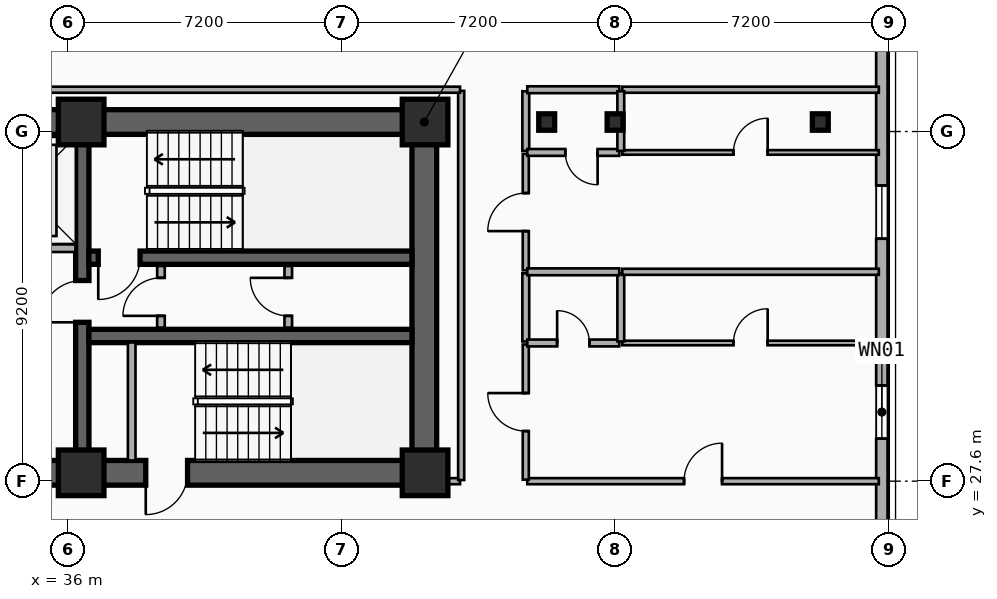
"""IFC4 building model, lengths in metres.
Left out: names, types, materials, properties, quantities, classifications, styles, units other than length and angle.
Written with IfcOpenShell. Run it as: python <this file> out.ifc"""

import sys

from ifc_helpers import new_model, si_unit, direction, frame, frame_2d, origin, origin_2d, place, context, subcontext, project, spatial, rectangle, i_section, extrude, element, fill, save


model = new_model("IFC4")
c1 = context("Model", 3, precision=1e-05, world=origin(), true_north=direction((0.0, 1.0)))
c2 = subcontext(c1, "Body", "Model", "MODEL_VIEW")
j1 = project(units=[si_unit("LENGTHUNIT", "METRE"), si_unit("PLANEANGLEUNIT", "RADIAN")], contexts=[c1])
p1 = place(None, origin())
s1 = spatial("IfcSite", under=j1, at=p1, CompositionType="ELEMENT")
p2 = place(p1, origin())
s2 = spatial("IfcBuilding", under=s1, at=p2, CompositionType="ELEMENT")
p3 = place(p2, frame((0.0, 0.0, 111.8)))
s3 = spatial("IfcBuildingStorey", under=s2, at=p3, CompositionType="ELEMENT", Elevation=111.8)
p4 = place(p3, frame((12.15, 37.05, 0.0), z_axis=(0.0, 0.0, 1.0), x_axis=(1.0, 0.0, 0.0)))
e1 = element("IfcWall", 1, at=p4, inside=s3, PredefinedType="SHEAR", context=c2, shape_type="SweptSolid", body=[
    extrude(rectangle(XDim=33.23, YDim=0.65, at=frame_2d((16.615, 0.0))), origin(), (0.0, 0.0, 1.0), 3.5),
])
p5 = place(p3, frame((45.38, 27.82, 0.0), z_axis=(0.0, 0.0, 1.0), x_axis=(-1.0, 0.0, 0.0)))
e2 = element("IfcWall", 2, at=p5, inside=s3, PredefinedType="SHEAR", context=c2, shape_type="SweptSolid", body=[
    extrude(rectangle(XDim=12.23, YDim=0.65, at=frame_2d((6.115, 0.0))), origin(), (0.0, 0.0, 1.0), 3.5),
])
p6 = place(p5, frame((9.93, 0.0, 0.0)))
e3 = element("IfcOpeningElement", 3, at=p6, cuts=e2, PredefinedType="OPENING", context=c2, shape_type="SweptSolid", body=[
    extrude(rectangle(XDim=1.1, YDim=2.15, at=frame_2d((0.55, 1.075))), frame((0.0, 0.335, 0.0), z_axis=(0.0, -1.0, 0.0), x_axis=(1.0, 0.0, 0.0)), (0.0, 0.0, 1.0), 0.67),
])
p7 = place(p5, frame((6.23, 0.0, 0.0)))
e4 = element("IfcOpeningElement", 4, at=p7, cuts=e2, PredefinedType="OPENING", context=c2, shape_type="SweptSolid", body=[
    extrude(rectangle(XDim=1.1, YDim=2.15, at=frame_2d((0.55, 1.075))), frame((0.0, 0.335, 0.0), z_axis=(0.0, -1.0, 0.0), x_axis=(1.0, 0.0, 0.0)), (0.0, 0.0, 1.0), 0.67),
])
p8 = place(p3, frame((45.38, 28.145, 0.0), z_axis=(0.0, 0.0, 1.0), x_axis=(0.0, 1.0, 0.0)))
e5 = element("IfcWall", 5, at=p8, inside=s3, PredefinedType="SHEAR", context=c2, shape_type="SweptSolid", body=[
    extrude(rectangle(XDim=8.58, YDim=0.65, at=frame_2d((4.29, 0.0))), origin(), (0.0, 0.0, 1.0), 3.5),
])
p9 = place(p3, frame((36.38, 28.145, 0.0), z_axis=(0.0, 0.0, 1.0), x_axis=(0.0, 1.0, 0.0)))
e6 = element("IfcWall", 6, at=p9, inside=s3, PredefinedType="SHEAR", context=c2, shape_type="SweptSolid", body=[
    extrude(rectangle(XDim=8.58, YDim=0.35, at=frame_2d((4.29, 0.0))), origin(), (0.0, 0.0, 1.0), 3.5),
])
p10 = place(p9, frame((3.635, 0.0, 0.0)))
e7 = element("IfcOpeningElement", 7, at=p10, cuts=e6, PredefinedType="OPENING", context=c2, shape_type="SweptSolid", body=[
    extrude(rectangle(XDim=1.1, YDim=2.15, at=frame_2d((0.55, 1.075))), frame((0.0, 0.185, 0.0), z_axis=(0.0, -1.0, 0.0), x_axis=(1.0, 0.0, 0.0)), (0.0, 0.0, 1.0), 0.37),
])
p11 = place(p3, frame((45.055, 33.48, 0.0), z_axis=(0.0, 0.0, 1.0), x_axis=(-1.0, 0.0, 0.0)))
e8 = element("IfcWall", 8, at=p11, inside=s3, PredefinedType="SHEAR", context=c2, shape_type="SweptSolid", body=[
    extrude(rectangle(XDim=8.5, YDim=0.35, at=frame_2d((4.25, 0.0))), origin(), (0.0, 0.0, 1.0), 3.5),
])
p12 = place(p11, frame((7.155, 0.0, 0.0)))
e9 = element("IfcOpeningElement", 9, at=p12, cuts=e8, PredefinedType="OPENING", context=c2, shape_type="SweptSolid", body=[
    extrude(rectangle(XDim=1.1, YDim=2.15, at=frame_2d((0.55, 1.075))), frame((0.0, 0.185, 0.0), z_axis=(0.0, -1.0, 0.0), x_axis=(1.0, 0.0, 0.0)), (0.0, 0.0, 1.0), 0.37),
])
p13 = place(p3, frame((36.555, 31.42, 0.0), z_axis=(0.0, 0.0, 1.0), x_axis=(1.0, 0.0, 0.0)))
e10 = element("IfcWall", 10, at=p13, inside=s3, PredefinedType="SHEAR", context=c2, shape_type="SweptSolid", body=[
    extrude(rectangle(XDim=8.5, YDim=0.35, at=frame_2d((4.25, 0.0))), origin(), (0.0, 0.0, 1.0), 3.5),
])
for number, where, z_axis, x_axis in (
    (11, (36.35, 27.82, 0.0), (0.0, 0.0, 1.0), (1.0, 0.0, 0.0)),
    (12, (36.35, 37.05, 0.0), (0.0, 0.0, 1.0), (1.0, 0.0, 0.0)),
    (13, (45.4, 27.82, 0.0), (0.0, 0.0, 1.0), (1.0, 0.0, 0.0)),
    (14, (45.4, 37.05, 0.0), (0.0, 0.0, 1.0), (1.0, 0.0, 0.0)),
):
    element("IfcColumn", number, at=place(p3, frame(where, z_axis=z_axis, x_axis=x_axis)), inside=s3, PredefinedType="COLUMN", context=c2, shape_type="SweptSolid", body=[
        extrude(rectangle(XDim=1.2, YDim=1.2, at=origin_2d()), origin(), (0.0, 0.0, 1.0), 3.5),
    ])
for number, where, z_axis, x_axis in (
    (15, (48.6, 37.05, 0.0), (0.0, 0.0, 1.0), (1.0, 0.0, 0.0)),
    (16, (50.4, 37.05, 0.0), (0.0, 0.0, 1.0), (1.0, 0.0, 0.0)),
    (17, (55.8, 37.05, 0.0), (0.0, 0.0, 1.0), (1.0, 0.0, 0.0)),
):
    element("IfcColumn", number, at=place(p3, frame(where, z_axis=z_axis, x_axis=x_axis)), inside=s3, PredefinedType="COLUMN", context=c2, shape_type="SweptSolid", body=[
        extrude(i_section(OverallWidth=0.418, OverallDepth=0.432, WebThickness=0.035, FlangeThickness=0.056, FilletRadius=0.015, at=origin_2d()), origin(), (0.0, 0.0, 1.0), 3.5),
    ])
p14 = place(p3, frame((57.42, 39.0, 0.0), z_axis=(0.0, 0.0, 1.0), x_axis=(0.0, -1.0, 0.0)))
e18 = element("IfcWall", 18, at=p14, inside=s3, PredefinedType="SOLIDWALL", context=c2, shape_type="SweptSolid", body=[
    extrude(rectangle(XDim=18.0, YDim=0.3, at=frame_2d((9.0, 0.0))), origin(), (0.0, 0.0, 1.0), 3.24),
])
p15 = place(p14, frame((8.882, 0.0, 0.48)))
e19 = element("IfcOpeningElement", 19, at=p15, cuts=e18, PredefinedType="OPENING", context=c2, shape_type="SweptSolid", body=[
    extrude(rectangle(XDim=1.4, YDim=1.8, at=frame_2d((0.7, 0.9))), frame((0.0, 0.16, 0.0), z_axis=(0.0, -1.0, 0.0), x_axis=(1.0, 0.0, 0.0)), (0.0, 0.0, 1.0), 0.32),
])
p16 = place(p14, frame((3.621, 0.0, 0.48)))
e20 = element("IfcOpeningElement", 20, at=p16, cuts=e18, PredefinedType="OPENING", context=c2, shape_type="SweptSolid", body=[
    extrude(rectangle(XDim=1.4, YDim=1.8, at=frame_2d((0.7, 0.9))), frame((0.0, 0.16, 0.0), z_axis=(0.0, -1.0, 0.0), x_axis=(1.0, 0.0, 0.0)), (0.0, 0.0, 1.0), 0.32),
])
p17 = place(p3, frame((33.475, 33.73, 0.0), z_axis=(0.0, 0.0, 1.0), x_axis=(1.0, 0.0, 0.0)))
e21 = element("IfcWall", 21, at=p17, inside=s3, PredefinedType="PARTITIONING", context=c2, shape_type="SweptSolid", body=[
    extrude(rectangle(XDim=2.725, YDim=0.2, at=frame_2d((1.362, 0.0))), origin(), (0.0, 0.0, 1.0), 2.212),
])
p18 = place(p17, frame((0.812, 0.0, 0.0)))
e22 = element("IfcOpeningElement", 22, at=p18, cuts=e21, PredefinedType="OPENING", context=c2, shape_type="SweptSolid", body=[
    extrude(rectangle(XDim=1.1, YDim=2.15, at=frame_2d((0.55, 1.075))), frame((0.0, 0.11, 0.0), z_axis=(0.0, -1.0, 0.0), x_axis=(1.0, 0.0, 0.0)), (0.0, 0.0, 1.0), 0.22),
])
p19 = place(p3, frame((37.68, 28.145, 0.0), z_axis=(0.0, 0.0, 1.0), x_axis=(0.0, 1.0, 0.0)))
e23 = element("IfcWall", 23, at=p19, inside=s3, PredefinedType="PARTITIONING", context=c2, shape_type="SweptSolid", body=[
    extrude(rectangle(XDim=3.105, YDim=0.2, at=frame_2d((1.552, 0.0))), origin(), (0.0, 0.0, 1.0), 2.62),
])
p20 = place(p3, frame((38.45, 31.64, 0.0), z_axis=(0.0, 0.0, 1.0), x_axis=(0.0, 1.0, 0.0)))
e24 = element("IfcWall", 24, at=p20, inside=s3, PredefinedType="PARTITIONING", context=c2, shape_type="SweptSolid", body=[
    extrude(rectangle(XDim=1.62, YDim=0.2, at=frame_2d((0.81, 0.0))), origin(), (0.0, 0.0, 1.0), 3.24),
])
p21 = place(p20, frame((0.31, 0.0, 0.0)))
e25 = element("IfcOpeningElement", 25, at=p21, cuts=e24, PredefinedType="OPENING", context=c2, shape_type="SweptSolid", body=[
    extrude(rectangle(XDim=1.0, YDim=2.15, at=frame_2d((0.5, 1.075))), frame((0.0, 0.11, 0.0), z_axis=(0.0, -1.0, 0.0), x_axis=(1.0, 0.0, 0.0)), (0.0, 0.0, 1.0), 0.22),
])
p22 = place(p3, frame((41.8, 31.64, 0.0), z_axis=(0.0, 0.0, 1.0), x_axis=(0.0, 1.0, 0.0)))
e26 = element("IfcWall", 26, at=p22, inside=s3, PredefinedType="PARTITIONING", context=c2, shape_type="SweptSolid", body=[
    extrude(rectangle(XDim=1.62, YDim=0.2, at=frame_2d((0.81, 0.0))), origin(), (0.0, 0.0, 1.0), 3.24),
])
p23 = place(p22, frame((0.31, 0.0, 0.0)))
e27 = element("IfcOpeningElement", 27, at=p23, cuts=e26, PredefinedType="OPENING", context=c2, shape_type="SweptSolid", body=[
    extrude(rectangle(XDim=1.0, YDim=2.15, at=frame_2d((0.5, 1.075))), frame((0.0, 0.11, 0.0), z_axis=(0.0, -1.0, 0.0), x_axis=(1.0, 0.0, 0.0)), (0.0, 0.0, 1.0), 0.22),
])
p24 = place(p3, frame((48.09, 27.6, 0.0), z_axis=(0.0, 0.0, 1.0), x_axis=(1.0, 0.0, 0.0)))
e28 = element("IfcWall", 28, at=p24, inside=s3, PredefinedType="PARTITIONING", context=c2, shape_type="SweptSolid", body=[
    extrude(rectangle(XDim=9.25, YDim=0.16, at=frame_2d((4.625, 0.0))), origin(), (0.0, 0.0, 1.0), 2.57),
])
p25 = place(p24, frame((4.125, 0.0, 0.0)))
e29 = element("IfcOpeningElement", 29, at=p25, cuts=e28, PredefinedType="OPENING", context=c2, shape_type="SweptSolid", body=[
    extrude(rectangle(XDim=1.0, YDim=2.15, at=frame_2d((0.5, 1.075))), frame((0.0, 0.09, 0.0), z_axis=(0.0, -1.0, 0.0), x_axis=(1.0, 0.0, 0.0)), (0.0, 0.0, 1.0), 0.18),
])
p26 = place(p3, frame((48.05, 27.64, 0.0), z_axis=(0.0, 0.0, 1.0), x_axis=(0.0, 1.0, 0.0)))
e30 = element("IfcWall", 30, at=p26, inside=s3, PredefinedType="PARTITIONING", context=c2, shape_type="SweptSolid", body=[
    extrude(rectangle(XDim=3.556, YDim=0.16, at=frame_2d((1.778, 0.0))), origin(), (0.0, 0.0, 1.0), 3.24),
])
p27 = place(p26, frame((1.278, 0.0, 0.0)))
e31 = element("IfcOpeningElement", 31, at=p27, cuts=e30, PredefinedType="OPENING", context=c2, shape_type="SweptSolid", body=[
    extrude(rectangle(XDim=1.0, YDim=2.15, at=frame_2d((0.5, 1.075))), frame((0.0, 0.09, 0.0), z_axis=(0.0, -1.0, 0.0), x_axis=(1.0, 0.0, 0.0)), (0.0, 0.0, 1.0), 0.18),
])
p28 = place(p3, frame((48.05, 31.276, 0.0), z_axis=(0.0, 0.0, 1.0), x_axis=(0.0, 1.0, 0.0)))
e32 = element("IfcWall", 32, at=p28, inside=s3, PredefinedType="PLUMBINGWALL", context=c2, shape_type="SweptSolid", body=[
    extrude(rectangle(XDim=1.793, YDim=0.18, at=frame_2d((0.896, 0.0))), origin(), (0.0, 0.0, 1.0), 3.24),
])
p29 = place(p3, frame((48.05, 33.149, 0.0), z_axis=(0.0, 0.0, 1.0), x_axis=(0.0, 1.0, 0.0)))
e33 = element("IfcWall", 33, at=p29, inside=s3, PredefinedType="PARTITIONING", context=c2, shape_type="SweptSolid", body=[
    extrude(rectangle(XDim=3.061, YDim=0.16, at=frame_2d((1.531, 0.0))), origin(), (0.0, 0.0, 1.0), 3.24),
])
p30 = place(p29, frame((1.031, 0.0, 0.0)))
e34 = element("IfcOpeningElement", 34, at=p30, cuts=e33, PredefinedType="OPENING", context=c2, shape_type="SweptSolid", body=[
    extrude(rectangle(XDim=1.0, YDim=2.15, at=frame_2d((0.5, 1.075))), frame((0.0, 0.09, 0.0), z_axis=(0.0, -1.0, 0.0), x_axis=(1.0, 0.0, 0.0)), (0.0, 0.0, 1.0), 0.18),
])
p31 = place(p3, frame((48.05, 36.29, 0.0), z_axis=(0.0, 0.0, 1.0), x_axis=(0.0, 1.0, 0.0)))
e35 = element("IfcWall", 35, at=p31, inside=s3, PredefinedType="PLUMBINGWALL", context=c2, shape_type="SweptSolid", body=[
    extrude(rectangle(XDim=1.57, YDim=0.18, at=frame_2d((0.785, 0.0))), origin(), (0.0, 0.0, 1.0), 2.72),
])
p32 = place(p3, frame((48.09, 37.9, 0.0), z_axis=(0.0, 0.0, 1.0), x_axis=(1.0, 0.0, 0.0)))
e36 = element("IfcWall", 36, at=p32, inside=s3, PredefinedType="PLUMBINGWALL", context=c2, shape_type="SweptSolid", body=[
    extrude(rectangle(XDim=2.42, YDim=0.18, at=frame_2d((1.21, 0.0))), origin(), (0.0, 0.0, 1.0), 3.24),
])
p33 = place(p3, frame((50.59, 37.9, 0.0), z_axis=(0.0, 0.0, 1.0), x_axis=(1.0, 0.0, 0.0)))
e37 = element("IfcWall", 37, at=p33, inside=s3, PredefinedType="PARTITIONING", context=c2, shape_type="SweptSolid", body=[
    extrude(rectangle(XDim=6.75, YDim=0.16, at=frame_2d((3.375, 0.0))), origin(), (0.0, 0.0, 1.0), 3.24),
])
p34 = place(p3, frame((48.09, 31.236, 0.0), z_axis=(0.0, 0.0, 1.0), x_axis=(1.0, 0.0, 0.0)))
e38 = element("IfcWall", 38, at=p34, inside=s3, PredefinedType="PLUMBINGWALL", context=c2, shape_type="SweptSolid", body=[
    extrude(rectangle(XDim=2.42, YDim=0.18, at=frame_2d((1.21, 0.0))), origin(), (0.0, 0.0, 1.0), 2.57),
])
p35 = place(p34, frame((0.785, 0.0, 0.0)))
e39 = element("IfcOpeningElement", 39, at=p35, cuts=e38, PredefinedType="OPENING", context=c2, shape_type="SweptSolid", body=[
    extrude(rectangle(XDim=0.85, YDim=2.1, at=frame_2d((0.425, 1.05))), frame((0.0, 0.1, 0.0), z_axis=(0.0, -1.0, 0.0), x_axis=(1.0, 0.0, 0.0)), (0.0, 0.0, 1.0), 0.2),
])
p36 = place(p3, frame((50.59, 31.236, 0.0), z_axis=(0.0, 0.0, 1.0), x_axis=(1.0, 0.0, 0.0)))
e40 = element("IfcWall", 40, at=p36, inside=s3, PredefinedType="PARTITIONING", context=c2, shape_type="SweptSolid", body=[
    extrude(rectangle(XDim=6.75, YDim=0.12, at=frame_2d((3.375, 0.0))), origin(), (0.0, 0.0, 1.0), 2.57),
])
p37 = place(p36, frame((2.925, 0.0, 0.0)))
e41 = element("IfcOpeningElement", 41, at=p37, cuts=e40, PredefinedType="OPENING", context=c2, shape_type="SweptSolid", body=[
    extrude(rectangle(XDim=0.9, YDim=2.1, at=frame_2d((0.45, 1.05))), frame((0.0, 0.07, 0.0), z_axis=(0.0, -1.0, 0.0), x_axis=(1.0, 0.0, 0.0)), (0.0, 0.0, 1.0), 0.14),
])
p38 = place(p3, frame((50.55, 31.276, 0.0), z_axis=(0.0, 0.0, 1.0), x_axis=(0.0, 1.0, 0.0)))
e42 = element("IfcWall", 42, at=p38, inside=s3, PredefinedType="PLUMBINGWALL", context=c2, shape_type="SweptSolid", body=[
    extrude(rectangle(XDim=1.793, YDim=0.18, at=frame_2d((0.896, 0.0))), origin(), (0.0, 0.0, 1.0), 2.57),
])
p39 = place(p3, frame((48.09, 33.109, 0.0), z_axis=(0.0, 0.0, 1.0), x_axis=(1.0, 0.0, 0.0)))
e43 = element("IfcWall", 43, at=p39, inside=s3, PredefinedType="PLUMBINGWALL", context=c2, shape_type="SweptSolid", body=[
    extrude(rectangle(XDim=2.42, YDim=0.18, at=frame_2d((1.21, 0.0))), origin(), (0.0, 0.0, 1.0), 2.57),
])
p40 = place(p3, frame((50.59, 33.109, 0.0), z_axis=(0.0, 0.0, 1.0), x_axis=(1.0, 0.0, 0.0)))
e44 = element("IfcWall", 44, at=p40, inside=s3, PredefinedType="PARTITIONING", context=c2, shape_type="SweptSolid", body=[
    extrude(rectangle(XDim=6.75, YDim=0.16, at=frame_2d((3.375, 0.0))), origin(), (0.0, 0.0, 1.0), 2.57),
])
p41 = place(p3, frame((50.51, 36.25, 0.0), z_axis=(0.0, 0.0, 1.0), x_axis=(-1.0, 0.0, 0.0)))
e45 = element("IfcWall", 45, at=p41, inside=s3, PredefinedType="PLUMBINGWALL", context=c2, shape_type="SweptSolid", body=[
    extrude(rectangle(XDim=2.42, YDim=0.18, at=frame_2d((1.21, 0.0))), origin(), (0.0, 0.0, 1.0), 2.57),
])
p42 = place(p41, frame((0.57, 0.0, 0.0)))
e46 = element("IfcOpeningElement", 46, at=p42, cuts=e45, PredefinedType="OPENING", context=c2, shape_type="SweptSolid", body=[
    extrude(rectangle(XDim=0.85, YDim=2.1, at=frame_2d((0.425, 1.05))), frame((0.0, 0.1, 0.0), z_axis=(0.0, -1.0, 0.0), x_axis=(1.0, 0.0, 0.0)), (0.0, 0.0, 1.0), 0.2),
])
p43 = place(p3, frame((50.59, 36.25, 0.0), z_axis=(0.0, 0.0, 1.0), x_axis=(1.0, 0.0, 0.0)))
e47 = element("IfcWall", 47, at=p43, inside=s3, PredefinedType="PARTITIONING", context=c2, shape_type="SweptSolid", body=[
    extrude(rectangle(XDim=6.75, YDim=0.12, at=frame_2d((3.375, 0.0))), origin(), (0.0, 0.0, 1.0), 2.57),
])
p44 = place(p43, frame((2.925, 0.0, 0.0)))
e48 = element("IfcOpeningElement", 48, at=p44, cuts=e47, PredefinedType="OPENING", context=c2, shape_type="SweptSolid", body=[
    extrude(rectangle(XDim=0.9, YDim=2.1, at=frame_2d((0.45, 1.05))), frame((0.0, 0.07, 0.0), z_axis=(0.0, -1.0, 0.0), x_axis=(1.0, 0.0, 0.0)), (0.0, 0.0, 1.0), 0.14),
])
p45 = place(p3, frame((50.55, 36.29, 0.0), z_axis=(0.0, 0.0, 1.0), x_axis=(0.0, 1.0, 0.0)))
e49 = element("IfcWall", 49, at=p45, inside=s3, PredefinedType="PLUMBINGWALL", context=c2, shape_type="SweptSolid", body=[
    extrude(rectangle(XDim=1.57, YDim=0.18, at=frame_2d((0.785, 0.0))), origin(), (0.0, 0.0, 1.0), 2.57),
])
p46 = place(p3, frame((45.41, 27.6, 0.0), z_axis=(0.0, 0.0, 1.0), x_axis=(1.0, 0.0, 0.0)))
e50 = element("IfcWall", 50, at=p46, inside=s3, PredefinedType="PARTITIONING", context=c2, shape_type="SweptSolid", body=[
    extrude(rectangle(XDim=0.91, YDim=0.16, at=frame_2d((0.455, 0.0))), origin(), (0.0, 0.0, 1.0), 2.28),
])
p47 = place(p3, frame((46.35, 27.63, 0.0), z_axis=(0.0, 0.0, 1.0), x_axis=(0.0, 1.0, 0.0)))
e51 = element("IfcWall", 51, at=p47, inside=s3, PredefinedType="PARTITIONING", context=c2, shape_type="SweptSolid", body=[
    extrude(rectangle(XDim=10.24, YDim=0.16, at=frame_2d((5.12, 0.0))), origin(), (0.0, 0.0, 1.0), 2.72),
])
p48 = place(p3, frame((11.28, 37.9, 0.0), z_axis=(0.0, 0.0, 1.0), x_axis=(1.0, 0.0, 0.0)))
e52 = element("IfcWall", 52, at=p48, inside=s3, PredefinedType="PARTITIONING", context=c2, shape_type="SweptSolid", body=[
    extrude(rectangle(XDim=35.04, YDim=0.16, at=frame_2d((17.52, 0.0))), origin(), (0.0, 0.0, 1.0), 3.24),
])
p49 = place(p15, origin())
e53 = element("IfcWindow", 53, at=p49, inside=s3, PartitioningType="SINGLE_PANEL", PredefinedType="WINDOW", context=c2, shape_type="SweptSolid", body=[
    extrude(rectangle(XDim=1.4, YDim=1.8, at=frame_2d((0.7, 0.9))), frame((0.0, 0.03, 0.0), z_axis=(0.0, -1.0, 0.0), x_axis=(1.0, 0.0, 0.0)), (0.0, 0.0, 1.0), 0.06),
])
fill(e19, e53)
p50 = place(p16, origin())
e54 = element("IfcWindow", 54, at=p50, inside=s3, PartitioningType="SINGLE_PANEL", PredefinedType="WINDOW", context=c2, shape_type="SweptSolid", body=[
    extrude(rectangle(XDim=1.4, YDim=1.8, at=frame_2d((0.7, 0.9))), frame((0.0, 0.03, 0.0), z_axis=(0.0, -1.0, 0.0), x_axis=(1.0, 0.0, 0.0)), (0.0, 0.0, 1.0), 0.06),
])
fill(e20, e54)
p51 = place(p12, origin())
e55 = element("IfcDoor", 55, at=p51, inside=s3, OperationType="SINGLE_SWING_RIGHT", PredefinedType="DOOR", context=c2, shape_type="SweptSolid", body=[
    extrude(rectangle(XDim=1.1, YDim=2.15, at=frame_2d((0.55, 1.075))), frame((0.0, 0.025, 0.0), z_axis=(0.0, -1.0, 0.0), x_axis=(1.0, 0.0, 0.0)), (0.0, 0.0, 1.0), 0.05),
])
fill(e9, e55)
p52 = place(p10, origin())
e56 = element("IfcDoor", 56, at=p52, inside=s3, OperationType="SINGLE_SWING_LEFT", PredefinedType="DOOR", context=c2, shape_type="SweptSolid", body=[
    extrude(rectangle(XDim=1.1, YDim=2.15, at=frame_2d((0.55, 1.075))), frame((0.0, 0.025, 0.0), z_axis=(0.0, -1.0, 0.0), x_axis=(1.0, 0.0, 0.0)), (0.0, 0.0, 1.0), 0.05),
])
fill(e7, e56)
p53 = place(p7, origin())
e57 = element("IfcDoor", 57, at=p53, inside=s3, OperationType="SINGLE_SWING_RIGHT", PredefinedType="DOOR", context=c2, shape_type="SweptSolid", body=[
    extrude(rectangle(XDim=1.1, YDim=2.15, at=frame_2d((0.55, 1.075))), frame((0.0, 0.025, 0.0), z_axis=(0.0, -1.0, 0.0), x_axis=(1.0, 0.0, 0.0)), (0.0, 0.0, 1.0), 0.05),
])
fill(e4, e57)
p54 = place(p21, origin())
e58 = element("IfcDoor", 58, at=p54, inside=s3, OperationType="SINGLE_SWING_LEFT", PredefinedType="DOOR", context=c2, shape_type="SweptSolid", body=[
    extrude(rectangle(XDim=1.0, YDim=2.15, at=frame_2d((0.5, 1.075))), frame((0.0, 0.025, 0.0), z_axis=(0.0, -1.0, 0.0), x_axis=(1.0, 0.0, 0.0)), (0.0, 0.0, 1.0), 0.05),
])
fill(e25, e58)
p55 = place(p23, origin())
e59 = element("IfcDoor", 59, at=p55, inside=s3, OperationType="SINGLE_SWING_RIGHT", PredefinedType="DOOR", context=c2, shape_type="SweptSolid", body=[
    extrude(rectangle(XDim=1.0, YDim=2.15, at=frame_2d((0.5, 1.075))), frame((0.0, 0.025, 0.0), z_axis=(0.0, -1.0, 0.0), x_axis=(1.0, 0.0, 0.0)), (0.0, 0.0, 1.0), 0.05),
])
fill(e27, e59)
p56 = place(p25, origin())
e60 = element("IfcDoor", 60, at=p56, inside=s3, OperationType="SINGLE_SWING_RIGHT", PredefinedType="DOOR", context=c2, shape_type="SweptSolid", body=[
    extrude(rectangle(XDim=1.0, YDim=2.15, at=frame_2d((0.5, 1.075))), frame((0.0, 0.025, 0.0), z_axis=(0.0, -1.0, 0.0), x_axis=(1.0, 0.0, 0.0)), (0.0, 0.0, 1.0), 0.05),
])
fill(e29, e60)
p57 = place(p27, origin())
e61 = element("IfcDoor", 61, at=p57, inside=s3, OperationType="SINGLE_SWING_RIGHT", PredefinedType="DOOR", context=c2, shape_type="SweptSolid", body=[
    extrude(rectangle(XDim=1.0, YDim=2.15, at=frame_2d((0.5, 1.075))), frame((0.0, 0.025, 0.0), z_axis=(0.0, -1.0, 0.0), x_axis=(1.0, 0.0, 0.0)), (0.0, 0.0, 1.0), 0.05),
])
fill(e31, e61)
p58 = place(p30, origin())
e62 = element("IfcDoor", 62, at=p58, inside=s3, OperationType="SINGLE_SWING_LEFT", PredefinedType="DOOR", context=c2, shape_type="SweptSolid", body=[
    extrude(rectangle(XDim=1.0, YDim=2.15, at=frame_2d((0.5, 1.075))), frame((0.0, 0.025, 0.0), z_axis=(0.0, -1.0, 0.0), x_axis=(1.0, 0.0, 0.0)), (0.0, 0.0, 1.0), 0.05),
])
fill(e34, e62)
p59 = place(p35, origin())
e63 = element("IfcDoor", 63, at=p59, inside=s3, OperationType="SINGLE_SWING_LEFT", PredefinedType="DOOR", context=c2, shape_type="SweptSolid", body=[
    extrude(rectangle(XDim=0.85, YDim=2.1, at=frame_2d((0.425, 1.05))), frame((0.0, 0.025, 0.0), z_axis=(0.0, -1.0, 0.0), x_axis=(1.0, 0.0, 0.0)), (0.0, 0.0, 1.0), 0.05),
])
fill(e39, e63)
p60 = place(p37, origin())
e64 = element("IfcDoor", 64, at=p60, inside=s3, OperationType="SINGLE_SWING_RIGHT", PredefinedType="DOOR", context=c2, shape_type="SweptSolid", body=[
    extrude(rectangle(XDim=0.9, YDim=2.1, at=frame_2d((0.45, 1.05))), frame((0.0, 0.025, 0.0), z_axis=(0.0, -1.0, 0.0), x_axis=(1.0, 0.0, 0.0)), (0.0, 0.0, 1.0), 0.05),
])
fill(e41, e64)
p61 = place(p42, origin())
e65 = element("IfcDoor", 65, at=p61, inside=s3, OperationType="SINGLE_SWING_LEFT", PredefinedType="DOOR", context=c2, shape_type="SweptSolid", body=[
    extrude(rectangle(XDim=0.85, YDim=2.1, at=frame_2d((0.425, 1.05))), frame((0.0, 0.025, 0.0), z_axis=(0.0, -1.0, 0.0), x_axis=(1.0, 0.0, 0.0)), (0.0, 0.0, 1.0), 0.05),
])
fill(e46, e65)
p62 = place(p44, origin())
e66 = element("IfcDoor", 66, at=p62, inside=s3, OperationType="SINGLE_SWING_RIGHT", PredefinedType="DOOR", context=c2, shape_type="SweptSolid", body=[
    extrude(rectangle(XDim=0.9, YDim=2.1, at=frame_2d((0.45, 1.05))), frame((0.0, 0.025, 0.0), z_axis=(0.0, -1.0, 0.0), x_axis=(1.0, 0.0, 0.0)), (0.0, 0.0, 1.0), 0.05),
])
fill(e48, e66)
save(model, sys.argv[1])
